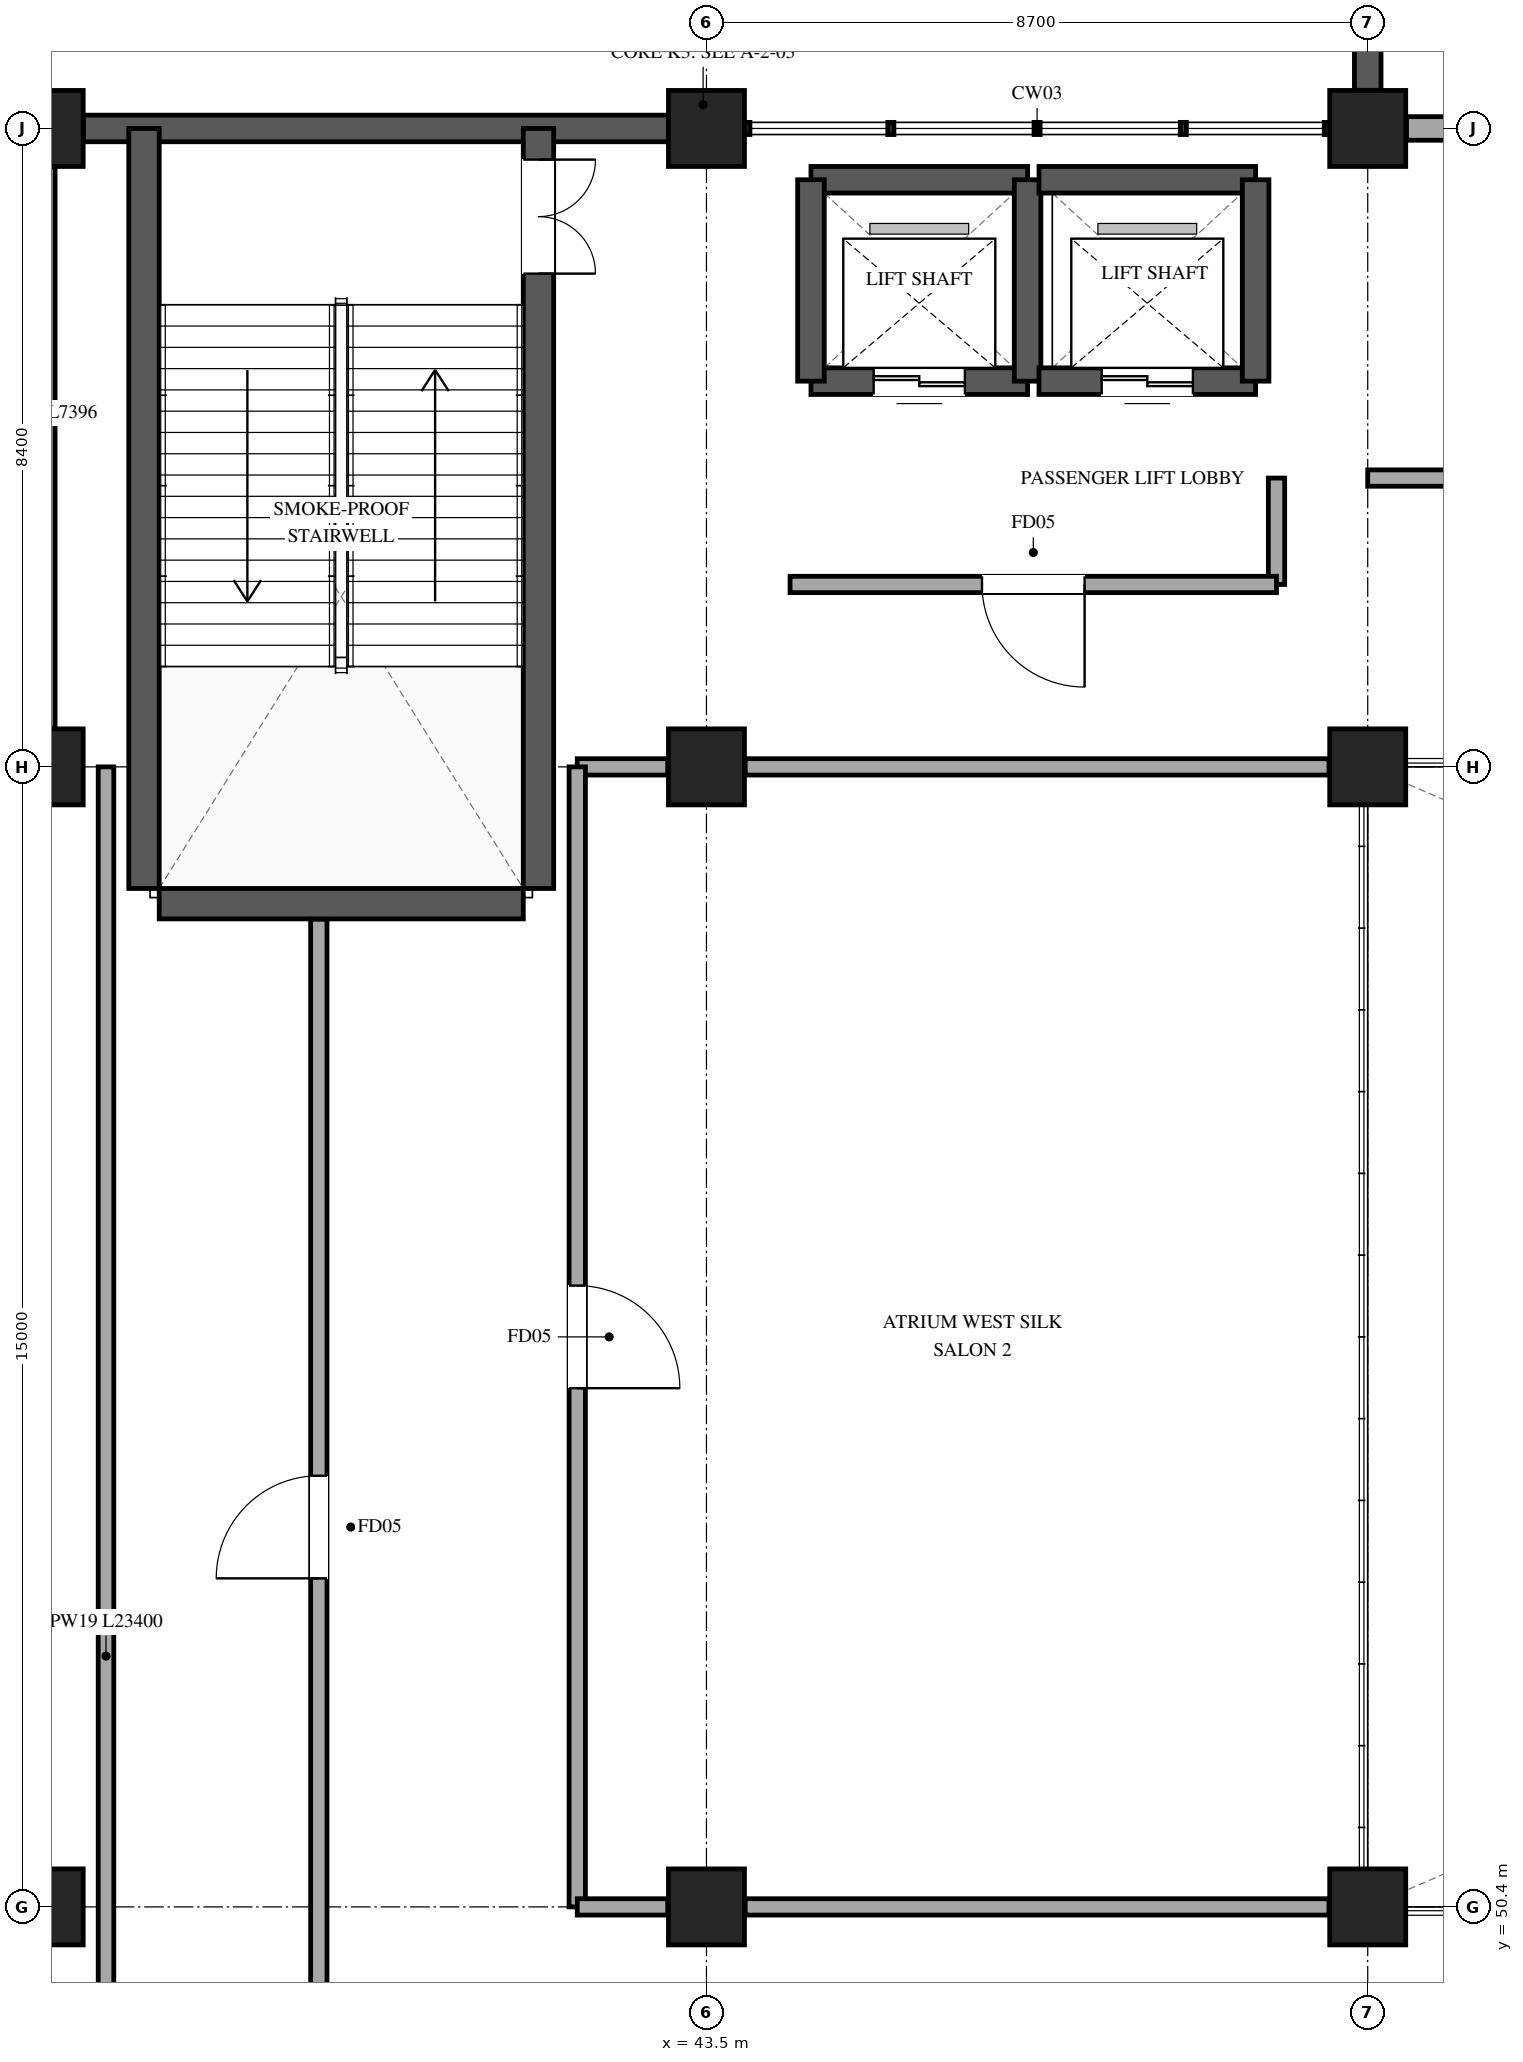
"""IFC4 building model, lengths in metres.
Left out: names, types, materials, properties, quantities, classifications, styles, units other than length and angle.
Written with IfcOpenShell. Run it as: python <this file> out.ifc"""

import sys

from ifc_helpers import new_model, si_unit, direction, frame, frame_2d, origin, origin_2d, place, context, subcontext, project, spatial, rectangle, extrude, element, fill, save


model = new_model("IFC4")
c1 = context("Model", 3, precision=1e-05, world=origin(), true_north=direction((0.0, 1.0)))
c2 = subcontext(c1, "Body", "Model", "MODEL_VIEW")
j1 = project(units=[si_unit("LENGTHUNIT", "METRE"), si_unit("PLANEANGLEUNIT", "RADIAN")], contexts=[c1])
p1 = place(None, origin())
s1 = spatial("IfcSite", under=j1, at=p1, CompositionType="ELEMENT")
p2 = place(p1, origin())
s2 = spatial("IfcBuilding", under=s1, at=p2, CompositionType="ELEMENT")
p3 = place(p2, frame((0.0, 0.0, 6.0)))
s3 = spatial("IfcBuildingStorey", under=s2, at=p3, CompositionType="ELEMENT", Elevation=6.0)
for number, where, z_axis, x_axis in (
    (1, (34.8, 50.4, 0.0), (0.0, 0.0, 1.0), (1.0, 0.0, 0.0)),
    (2, (34.8, 65.4, 0.0), (0.0, 0.0, 1.0), (1.0, 0.0, 0.0)),
    (3, (34.8, 73.8, 0.0), (0.0, 0.0, 1.0), (1.0, 0.0, 0.0)),
    (4, (43.5, 50.4, 0.0), (0.0, 0.0, 1.0), (1.0, 0.0, 0.0)),
    (5, (43.5, 65.4, 0.0), (0.0, 0.0, 1.0), (1.0, 0.0, 0.0)),
    (6, (43.5, 73.8, 0.0), (0.0, 0.0, 1.0), (1.0, 0.0, 0.0)),
    (7, (52.2, 50.4, 0.0), (0.0, 0.0, 1.0), (1.0, 0.0, 0.0)),
    (8, (52.2, 65.4, 0.0), (0.0, 0.0, 1.0), (1.0, 0.0, 0.0)),
    (9, (52.2, 73.8, 0.0), (0.0, 0.0, 1.0), (1.0, 0.0, 0.0)),
):
    element("IfcColumn", number, at=place(p3, frame(where, z_axis=z_axis, x_axis=x_axis)), inside=s3, PredefinedType="COLUMN", context=c2, shape_type="SweptSolid", body=[
        extrude(rectangle(XDim=1.0, YDim=1.0, at=origin_2d()), origin(), (0.0, 0.0, 1.0), 5.4),
    ])
p4 = place(p3, frame((34.8, 65.902, 0.0), z_axis=(0.0, 0.0, 1.0), x_axis=(0.0, 1.0, 0.0)))
e10 = element("IfcWall", 10, at=p4, inside=s3, PredefinedType="STANDARD", context=c2, shape_type="SweptSolid", body=[
    extrude(rectangle(XDim=7.396, YDim=0.26, at=frame_2d((3.698, 0.0))), origin(), (0.0, 0.0, 1.0), 4.455),
])
p5 = place(p3, frame((35.302, 73.8, 0.0), z_axis=(0.0, 0.0, 1.0), x_axis=(1.0, 0.0, 0.0)))
e11 = element("IfcWall", 11, at=p5, inside=s3, PredefinedType="STANDARD", context=c2, shape_type="SweptSolid", body=[
    extrude(rectangle(XDim=7.696, YDim=0.35, at=frame_2d((3.848, 0.0))), origin(), (0.0, 0.0, 1.0), 5.09),
])
p6 = place(p3, frame((52.2, 74.302, 0.0), z_axis=(0.0, 0.0, 1.0), x_axis=(0.0, 1.0, 0.0)))
e12 = element("IfcWall", 12, at=p6, inside=s3, PredefinedType="STANDARD", context=c2, shape_type="SweptSolid", body=[
    extrude(rectangle(XDim=7.446, YDim=0.35, at=frame_2d((3.723, 0.0))), origin(), (0.0, 0.0, 1.0), 5.09),
])
p7 = place(p6, frame((1.723, 0.0, 0.85)))
e13 = element("IfcOpeningElement", 13, at=p7, cuts=e12, PredefinedType="OPENING", context=c2, shape_type="SweptSolid", body=[
    extrude(rectangle(XDim=4.0, YDim=2.75, at=frame_2d((2.0, 1.375))), frame((0.0, 0.185, 0.0), z_axis=(0.0, -1.0, 0.0), x_axis=(1.0, 0.0, 0.0)), (0.0, 0.0, 1.0), 0.37),
])
p8 = place(p3, frame((36.1, 63.8, 0.0), z_axis=(0.0, 0.0, 1.0), x_axis=(0.0, 1.0, 0.0)))
e14 = element("IfcWall", 14, at=p8, inside=s3, PredefinedType="SHEAR", context=c2, shape_type="SweptSolid", body=[
    extrude(rectangle(XDim=10.0, YDim=0.4, at=frame_2d((5.0, 0.0))), origin(), (0.0, 0.0, 1.0), 5.4),
])
p9 = place(p3, frame((41.29, 73.8, 0.0), z_axis=(0.0, 0.0, 1.0), x_axis=(0.0, -1.0, 0.0)))
e15 = element("IfcWall", 15, at=p9, inside=s3, PredefinedType="SHEAR", context=c2, shape_type="SweptSolid", body=[
    extrude(rectangle(XDim=10.0, YDim=0.4, at=frame_2d((5.0, 0.0))), origin(), (0.0, 0.0, 1.0), 5.4),
])
p10 = place(p9, frame((0.41, 0.0, 0.0)))
e16 = element("IfcOpeningElement", 16, at=p10, cuts=e15, PredefinedType="OPENING", context=c2, shape_type="SweptSolid", body=[
    extrude(rectangle(XDim=1.5, YDim=2.2, at=frame_2d((0.75, 1.1))), frame((0.0, 0.21, 0.0), z_axis=(0.0, -1.0, 0.0), x_axis=(1.0, 0.0, 0.0)), (0.0, 0.0, 1.0), 0.42),
])
p11 = place(p3, frame((41.09, 63.6, 0.0), z_axis=(0.0, 0.0, 1.0), x_axis=(-1.0, 0.0, 0.0)))
e17 = element("IfcWall", 17, at=p11, inside=s3, PredefinedType="SHEAR", context=c2, shape_type="SweptSolid", body=[
    extrude(rectangle(XDim=4.79, YDim=0.4, at=frame_2d((2.395, 0.0))), origin(), (0.0, 0.0, 1.0), 5.4),
])
p12 = place(p3, frame((44.875, 73.125, 0.0), z_axis=(0.0, 0.0, 1.0), x_axis=(1.0, 0.0, 0.0)))
e18 = element("IfcWall", 18, at=p12, inside=s3, PredefinedType="SHEAR", context=c2, shape_type="SweptSolid", body=[
    extrude(rectangle(XDim=2.85, YDim=0.35, at=frame_2d((1.425, 0.0))), origin(), (0.0, 0.0, 1.0), 5.4),
])
p13 = place(p3, frame((47.725, 70.475, 0.0), z_axis=(0.0, 0.0, 1.0), x_axis=(-1.0, 0.0, 0.0)))
e19 = element("IfcWall", 19, at=p13, inside=s3, PredefinedType="SHEAR", context=c2, shape_type="SweptSolid", body=[
    extrude(rectangle(XDim=2.85, YDim=0.35, at=frame_2d((1.425, 0.0))), origin(), (0.0, 0.0, 1.0), 5.4),
])
p14 = place(p13, frame((0.825, 0.0, 0.0)))
e20 = element("IfcOpeningElement", 20, at=p14, cuts=e19, PredefinedType="OPENING", context=c2, shape_type="SweptSolid", body=[
    extrude(rectangle(XDim=1.2, YDim=2.2, at=frame_2d((0.6, 1.1))), frame((0.0, 0.185, 0.0), z_axis=(0.0, -1.0, 0.0), x_axis=(1.0, 0.0, 0.0)), (0.0, 0.0, 1.0), 0.37),
])
for number, where, z_axis, x_axis in (
    (21, (44.875, 70.475, 0.0), (0.0, 0.0, 1.0), (0.0, 1.0, 0.0)),
    (22, (47.725, 73.125, 0.0), (0.0, 0.0, 1.0), (0.0, -1.0, 0.0)),
):
    element("IfcWall", number, at=place(p3, frame(where, z_axis=z_axis, x_axis=x_axis)), inside=s3, PredefinedType="SHEAR", context=c2, shape_type="SweptSolid", body=[
        extrude(rectangle(XDim=2.65, YDim=0.35, at=frame_2d((1.325, 0.0))), origin(), (0.0, 0.0, 1.0), 5.4),
    ])
p15 = place(p3, frame((47.875, 73.125, 0.0), z_axis=(0.0, 0.0, 1.0), x_axis=(1.0, 0.0, 0.0)))
e23 = element("IfcWall", 23, at=p15, inside=s3, PredefinedType="SHEAR", context=c2, shape_type="SweptSolid", body=[
    extrude(rectangle(XDim=2.85, YDim=0.35, at=frame_2d((1.425, 0.0))), origin(), (0.0, 0.0, 1.0), 5.4),
])
p16 = place(p3, frame((50.725, 70.475, 0.0), z_axis=(0.0, 0.0, 1.0), x_axis=(-1.0, 0.0, 0.0)))
e24 = element("IfcWall", 24, at=p16, inside=s3, PredefinedType="SHEAR", context=c2, shape_type="SweptSolid", body=[
    extrude(rectangle(XDim=2.85, YDim=0.35, at=frame_2d((1.425, 0.0))), origin(), (0.0, 0.0, 1.0), 5.4),
])
p17 = place(p16, frame((0.825, 0.0, 0.0)))
e25 = element("IfcOpeningElement", 25, at=p17, cuts=e24, PredefinedType="OPENING", context=c2, shape_type="SweptSolid", body=[
    extrude(rectangle(XDim=1.2, YDim=2.2, at=frame_2d((0.6, 1.1))), frame((0.0, 0.185, 0.0), z_axis=(0.0, -1.0, 0.0), x_axis=(1.0, 0.0, 0.0)), (0.0, 0.0, 1.0), 0.37),
])
p18 = place(p3, frame((50.725, 73.125, 0.0), z_axis=(0.0, 0.0, 1.0), x_axis=(0.0, -1.0, 0.0)))
e26 = element("IfcWall", 26, at=p18, inside=s3, PredefinedType="SHEAR", context=c2, shape_type="SweptSolid", body=[
    extrude(rectangle(XDim=2.65, YDim=0.35, at=frame_2d((1.325, 0.0))), origin(), (0.0, 0.0, 1.0), 5.4),
])
p19 = place(p3, frame((51.0, 69.2, 0.0), z_axis=(0.0, 0.0, 1.0), x_axis=(0.0, -1.0, 0.0)))
e27 = element("IfcWall", 27, at=p19, inside=s3, PredefinedType="PARTITIONING", context=c2, shape_type="SweptSolid", body=[
    extrude(rectangle(XDim=1.4, YDim=0.215, at=frame_2d((0.7, 0.0))), origin(), (0.0, 0.0, 1.0), 5.06),
])
p20 = place(p3, frame((51.0, 67.8, 0.0), z_axis=(0.0, 0.0, 1.0), x_axis=(-1.0, 0.0, 0.0)))
e28 = element("IfcWall", 28, at=p20, inside=s3, PredefinedType="PARTITIONING", context=c2, shape_type="SweptSolid", body=[
    extrude(rectangle(XDim=6.4, YDim=0.215, at=frame_2d((3.2, 0.0))), origin(), (0.0, 0.0, 1.0), 5.06),
])
p21 = place(p20, frame((2.525, 0.0, 0.0)))
e29 = element("IfcOpeningElement", 29, at=p21, cuts=e28, PredefinedType="OPENING", context=c2, shape_type="SweptSolid", body=[
    extrude(rectangle(XDim=1.35, YDim=2.2, at=frame_2d((0.675, 1.1))), frame((0.0, 0.118, 0.0), z_axis=(0.0, -1.0, 0.0), x_axis=(1.0, 0.0, 0.0)), (0.0, 0.0, 1.0), 0.235),
])
p22 = place(p3, frame((38.4, 47.4, 0.0), z_axis=(0.0, 0.0, 1.0), x_axis=(0.0, 1.0, 0.0)))
e30 = element("IfcWall", 30, at=p22, inside=s3, PredefinedType="PARTITIONING", context=c2, shape_type="SweptSolid", body=[
    extrude(rectangle(XDim=15.995, YDim=0.215, at=frame_2d((7.998, 0.0))), origin(), (0.0, 0.0, 1.0), 4.31),
])
p23 = place(p22, frame((7.323, 0.0, 0.0)))
e31 = element("IfcOpeningElement", 31, at=p23, cuts=e30, PredefinedType="OPENING", context=c2, shape_type="SweptSolid", body=[
    extrude(rectangle(XDim=1.35, YDim=2.2, at=frame_2d((0.675, 1.1))), frame((0.0, 0.118, 0.0), z_axis=(0.0, -1.0, 0.0), x_axis=(1.0, 0.0, 0.0)), (0.0, 0.0, 1.0), 0.235),
])
p24 = place(p3, frame((51.69, 65.4, 0.0), z_axis=(0.0, 0.0, 1.0), x_axis=(-1.0, 0.0, 0.0)))
e32 = element("IfcWall", 32, at=p24, inside=s3, PredefinedType="PARTITIONING", context=c2, shape_type="SweptSolid", body=[
    extrude(rectangle(XDim=7.68, YDim=0.215, at=frame_2d((3.84, 0.0))), origin(), (0.0, 0.0, 1.0), 4.31),
])
p25 = place(p3, frame((42.99, 65.4, 0.0), z_axis=(0.0, 0.0, 1.0), x_axis=(-1.0, 0.0, 0.0)))
e33 = element("IfcWall", 33, at=p25, inside=s3, PredefinedType="PARTITIONING", context=c2, shape_type="SweptSolid", body=[
    extrude(rectangle(XDim=1.19, YDim=0.215, at=frame_2d((0.595, 0.0))), origin(), (0.0, 0.0, 1.0), 5.06),
])
p26 = place(p3, frame((41.8, 65.4, 0.0), z_axis=(0.0, 0.0, 1.0), x_axis=(0.0, -1.0, 0.0)))
e34 = element("IfcWall", 34, at=p26, inside=s3, PredefinedType="PARTITIONING", context=c2, shape_type="SweptSolid", body=[
    extrude(rectangle(XDim=15.0, YDim=0.215, at=frame_2d((7.5, 0.0))), origin(), (0.0, 0.0, 1.0), 4.31),
])
p27 = place(p26, frame((6.825, 0.0, 0.0)))
e35 = element("IfcOpeningElement", 35, at=p27, cuts=e34, PredefinedType="OPENING", context=c2, shape_type="SweptSolid", body=[
    extrude(rectangle(XDim=1.35, YDim=2.2, at=frame_2d((0.675, 1.1))), frame((0.0, 0.118, 0.0), z_axis=(0.0, -1.0, 0.0), x_axis=(1.0, 0.0, 0.0)), (0.0, 0.0, 1.0), 0.235),
])
p28 = place(p3, frame((41.8, 50.4, 0.0), z_axis=(0.0, 0.0, 1.0), x_axis=(1.0, 0.0, 0.0)))
e36 = element("IfcWall", 36, at=p28, inside=s3, PredefinedType="PARTITIONING", context=c2, shape_type="SweptSolid", body=[
    extrude(rectangle(XDim=1.19, YDim=0.215, at=frame_2d((0.595, 0.0))), origin(), (0.0, 0.0, 1.0), 4.31),
])
p29 = place(p3, frame((44.01, 50.4, 0.0), z_axis=(0.0, 0.0, 1.0), x_axis=(1.0, 0.0, 0.0)))
e37 = element("IfcWall", 37, at=p29, inside=s3, PredefinedType="PARTITIONING", context=c2, shape_type="SweptSolid", body=[
    extrude(rectangle(XDim=7.68, YDim=0.215, at=frame_2d((3.84, 0.0))), origin(), (0.0, 0.0, 1.0), 4.31),
])
p30 = place(p3, frame((52.2, 69.2, 0.0), z_axis=(0.0, 0.0, 1.0), x_axis=(1.0, 0.0, 0.0)))
e38 = element("IfcWall", 38, at=p30, inside=s3, PredefinedType="PARTITIONING", context=c2, shape_type="SweptSolid", body=[
    extrude(rectangle(XDim=36.0, YDim=0.215, at=frame_2d((18.0, 0.0))), origin(), (0.0, 0.0, 1.0), 4.31),
])
p31 = place(p30, frame((17.325, 0.0, 0.0)))
e39 = element("IfcOpeningElement", 39, at=p31, cuts=e38, PredefinedType="OPENING", context=c2, shape_type="SweptSolid", body=[
    extrude(rectangle(XDim=1.35, YDim=2.2, at=frame_2d((0.675, 1.1))), frame((0.0, 0.118, 0.0), z_axis=(0.0, -1.0, 0.0), x_axis=(1.0, 0.0, 0.0)), (0.0, 0.0, 1.0), 0.235),
])
p32 = place(p3, frame((35.6, 65.4, 0.0), z_axis=(0.0, 0.0, 1.0), x_axis=(0.0, -1.0, 0.0)))
e40 = element("IfcWall", 40, at=p32, inside=s3, PredefinedType="PARTITIONING", context=c2, shape_type="SweptSolid", body=[
    extrude(rectangle(XDim=23.4, YDim=0.205, at=frame_2d((11.7, 0.0))), origin(), (0.0, 0.0, 1.0), 4.31),
])
p33 = place(p3, frame((52.71, 73.8, 0.0), z_axis=(0.0, 0.0, 1.0), x_axis=(1.0, 0.0, 0.0)))
e41 = element("IfcWall", 41, at=p33, inside=s3, PredefinedType="STANDARD", context=c2, shape_type="SweptSolid", body=[
    extrude(rectangle(XDim=7.68, YDim=0.31, at=frame_2d((3.84, 0.0))), origin(), (0.0, 0.0, 1.0), 4.46),
])
p34 = place(p10, origin())
e42 = element("IfcDoor", 42, at=p34, inside=s3, OperationType="DOUBLE_DOOR_SINGLE_SWING", PredefinedType="DOOR", context=c2, shape_type="SweptSolid", body=[
    extrude(rectangle(XDim=1.5, YDim=2.2, at=frame_2d((0.75, 1.1))), frame((0.0, 0.025, 0.0), z_axis=(0.0, -1.0, 0.0), x_axis=(1.0, 0.0, 0.0)), (0.0, 0.0, 1.0), 0.05),
])
fill(e16, e42)
p35 = place(p14, origin())
e43 = element("IfcDoor", 43, at=p35, inside=s3, OperationType="DOUBLE_DOOR_SLIDING", PredefinedType="DOOR", context=c2, shape_type="SweptSolid", body=[
    extrude(rectangle(XDim=1.2, YDim=2.2, at=frame_2d((0.6, 1.1))), frame((0.0, 0.025, 0.0), z_axis=(0.0, -1.0, 0.0), x_axis=(1.0, 0.0, 0.0)), (0.0, 0.0, 1.0), 0.05),
])
fill(e20, e43)
p36 = place(p17, origin())
e44 = element("IfcDoor", 44, at=p36, inside=s3, OperationType="DOUBLE_DOOR_SLIDING", PredefinedType="DOOR", context=c2, shape_type="SweptSolid", body=[
    extrude(rectangle(XDim=1.2, YDim=2.2, at=frame_2d((0.6, 1.1))), frame((0.0, 0.025, 0.0), z_axis=(0.0, -1.0, 0.0), x_axis=(1.0, 0.0, 0.0)), (0.0, 0.0, 1.0), 0.05),
])
fill(e25, e44)
p37 = place(p21, origin())
e45 = element("IfcDoor", 45, at=p37, inside=s3, OperationType="SINGLE_SWING_LEFT", PredefinedType="DOOR", context=c2, shape_type="SweptSolid", body=[
    extrude(rectangle(XDim=1.35, YDim=2.2, at=frame_2d((0.675, 1.1))), frame((0.0, 0.025, 0.0), z_axis=(0.0, -1.0, 0.0), x_axis=(1.0, 0.0, 0.0)), (0.0, 0.0, 1.0), 0.05),
])
fill(e29, e45)
p38 = place(p23, origin())
e46 = element("IfcDoor", 46, at=p38, inside=s3, OperationType="SINGLE_SWING_LEFT", PredefinedType="DOOR", context=c2, shape_type="SweptSolid", body=[
    extrude(rectangle(XDim=1.35, YDim=2.2, at=frame_2d((0.675, 1.1))), frame((0.0, 0.025, 0.0), z_axis=(0.0, -1.0, 0.0), x_axis=(1.0, 0.0, 0.0)), (0.0, 0.0, 1.0), 0.05),
])
fill(e31, e46)
p39 = place(p27, origin())
e47 = element("IfcDoor", 47, at=p39, inside=s3, OperationType="SINGLE_SWING_RIGHT", PredefinedType="DOOR", context=c2, shape_type="SweptSolid", body=[
    extrude(rectangle(XDim=1.35, YDim=2.2, at=frame_2d((0.675, 1.1))), frame((0.0, 0.025, 0.0), z_axis=(0.0, -1.0, 0.0), x_axis=(1.0, 0.0, 0.0)), (0.0, 0.0, 1.0), 0.05),
])
fill(e35, e47)
save(model, sys.argv[1])
